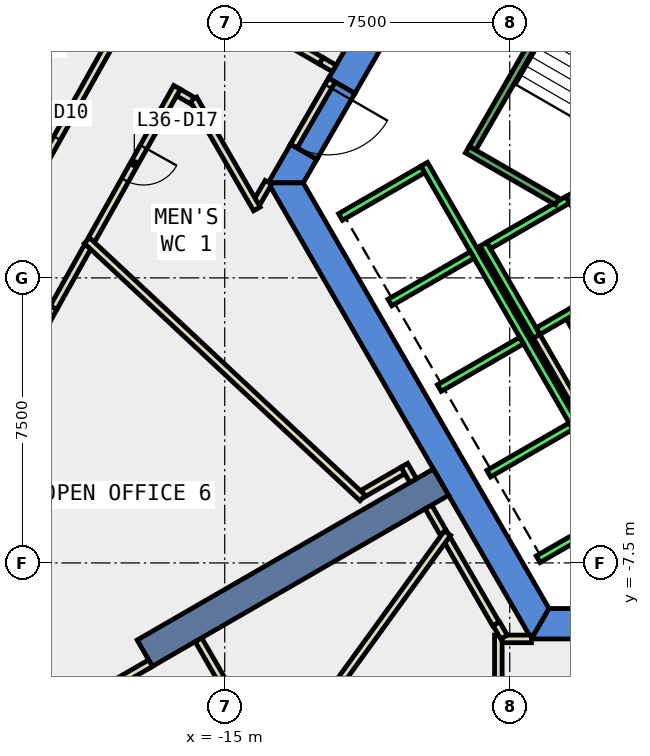
"""IFC4 building model, lengths in metres.
Left out: names, types, materials, properties, quantities, classifications, styles, units other than length and angle.
Written with IfcOpenShell. Run it as: python <this file> out.ifc"""

import sys

from ifc_helpers import new_model, si_unit, direction, frame, frame_2d, origin, place, context, subcontext, project, spatial, polyline, rectangle, outline, extrude, element, fill, save


model = new_model("IFC4")
c1 = context("Model", 3, precision=1e-05, world=origin(), true_north=direction((0.0, 1.0)))
c2 = subcontext(c1, "Body", "Model", "MODEL_VIEW")
j1 = project(units=[si_unit("LENGTHUNIT", "METRE"), si_unit("PLANEANGLEUNIT", "RADIAN")], contexts=[c1])
p1 = place(None, origin())
s1 = spatial("IfcSite", under=j1, at=p1, CompositionType="ELEMENT")
p2 = place(p1, origin())
s2 = spatial("IfcBuilding", under=s1, at=p2, CompositionType="ELEMENT")
p3 = place(p2, frame((0.0, 0.0, 163.4)))
s3 = spatial("IfcBuildingStorey", under=s2, at=p3, CompositionType="ELEMENT", Elevation=163.4)
p4 = place(p3, frame((0.0, 0.0, -0.4)))
e1 = element("IfcWall", 1, at=p4, inside=s3, PredefinedType="SHEAR", context=c2, shape_type="SweptSolid", body=[
    extrude(outline(polyline([(-12.267, 5.252), (-11.575, 4.852), (-6.466, 13.7), (-6.928, 14.5), (-12.267, 5.252)])), origin(), (0.0, 0.0, 1.0), 4.2),
])
p5 = place(p3, frame((0.0, 0.0, -0.4)))
e2 = element("IfcWall", 2, at=p5, inside=s3, PredefinedType="SHEAR", context=c2, shape_type="SweptSolid", body=[
    extrude(outline(polyline([(-12.575, 3.12), (-13.267, 3.52), (-13.856, 2.5), (-12.933, 2.5), (-12.575, 3.12)])), origin(), (0.0, 0.0, 1.0), 4.2),
])
p6 = place(p3, frame((0.0, 0.0, 3.6)))
e3 = element("IfcWall", 3, at=p6, inside=s3, PredefinedType="SHEAR", context=c2, shape_type="SweptSolid", body=[
    extrude(outline(polyline([(-13.267, 3.52), (-12.575, 3.12), (-11.575, 4.852), (-12.267, 5.252), (-13.267, 3.52)])), origin(), (0.0, 0.0, 1.0), 0.2),
])
p7 = place(p3, frame((0.0, 0.0, -0.4)))
e4 = element("IfcWall", 4, at=p7, inside=s3, PredefinedType="SHEAR", context=c2, shape_type="SweptSolid", body=[
    extrude(outline(polyline([(-13.856, 2.5), (-6.928, -9.5), (-6.466, -8.7), (-12.933, 2.5), (-13.856, 2.5)])), origin(), (0.0, 0.0, 1.0), 4.2),
])
p8 = place(p3, frame((0.0, 0.0, -0.4)))
e5 = element("IfcWall", 5, at=p8, inside=s3, PredefinedType="SHEAR", context=c2, shape_type="SweptSolid", body=[
    extrude(outline(polyline([(3.75, -9.5), (3.75, -8.7), (-6.466, -8.7), (-6.928, -9.5), (3.75, -9.5)])), origin(), (0.0, 0.0, 1.0), 4.2),
])
p9 = place(p3, frame((-9.31, -5.375, -0.4), z_axis=(0.0, 0.0, 1.0), x_axis=(-0.866017533419, -0.500013631625, 0.0)))
e6 = element("IfcWall", 6, at=p9, inside=s3, PredefinedType="SHEAR", context=c2, shape_type="SweptSolid", body=[
    extrude(rectangle(XDim=9.0, YDim=0.8, at=frame_2d((4.5, 0.0))), origin(), (0.0, 0.0, 1.0), 4.2),
])
p10 = place(p3, frame((-14.922, 7.131, 0.0), z_axis=(0.0, 0.0, 1.0), x_axis=(0.866124025492, -0.499829143273, 0.0)))
e7 = element("IfcWall", 7, at=p10, inside=s3, PredefinedType="PARTITIONING", context=c2, shape_type="SweptSolid", body=[
    extrude(rectangle(XDim=2.839, YDim=0.2, at=frame_2d((1.42, 0.0))), origin(), (0.0, 0.0, 1.0), 3.8),
])
p11 = place(p3, frame((-13.85, 2.514, 0.0), z_axis=(0.0, 0.0, 1.0), x_axis=(-0.500418219013, -0.865783810244, 0.0)))
e8 = element("IfcWall", 8, at=p11, inside=s3, PredefinedType="PARTITIONING", context=c2, shape_type="SweptSolid", body=[
    extrude(rectangle(XDim=0.607, YDim=0.2, at=frame_2d((0.304, 0.0))), origin(), (0.0, 0.0, 1.0), 3.8),
])
p12 = place(p3, frame((-14.154, 1.815, 0.0), z_axis=(0.0, 0.0, 1.0), x_axis=(-0.500038857296, 0.866002968352, 0.0)))
e9 = element("IfcWall", 9, at=p12, inside=s3, PredefinedType="PARTITIONING", context=c2, shape_type="SweptSolid", body=[
    extrude(rectangle(XDim=3.34, YDim=0.2, at=frame_2d((1.67, 0.0))), origin(), (0.0, 0.0, 1.0), 3.8),
])
p13 = place(p3, frame((-15.86, 4.671, 0.0), z_axis=(0.0, 0.0, 1.0), x_axis=(-0.866047486323, 0.49996174997, 0.0)))
e10 = element("IfcWall", 10, at=p13, inside=s3, PredefinedType="PARTITIONING", context=c2, shape_type="SweptSolid", body=[
    extrude(rectangle(XDim=0.412, YDim=0.2, at=frame_2d((0.206, 0.0))), origin(), (0.0, 0.0, 1.0), 3.8),
])
p14 = place(p3, frame((-16.255, 5.014, 0.0), z_axis=(0.0, 0.0, 1.0), x_axis=(-0.488988017817, -0.87229050117, 0.0)))
e11 = element("IfcWall", 11, at=p14, inside=s3, PredefinedType="PARTITIONING", context=c2, shape_type="SweptSolid", body=[
    extrude(rectangle(XDim=4.599, YDim=0.2, at=frame_2d((2.3, 0.0))), origin(), (0.0, 0.0, 1.0), 3.8),
])
p15 = place(p14, frame((1.8, 0.0, 0.0)))
e12 = element("IfcOpeningElement", 12, at=p15, cuts=e11, PredefinedType="OPENING", context=c2, shape_type="SweptSolid", body=[
    extrude(rectangle(XDim=1.0, YDim=2.1, at=frame_2d((0.5, 1.05))), frame((0.0, 0.11, 0.0), z_axis=(0.0, -1.0, 0.0), x_axis=(1.0, 0.0, 0.0)), (0.0, 0.0, 1.0), 0.22),
])
p16 = place(p3, frame((-18.602, 0.828, 0.0), z_axis=(0.0, 0.0, 1.0), x_axis=(-0.488969229043, -0.872301033502, 0.0)))
e13 = element("IfcWall", 13, at=p16, inside=s3, PredefinedType="PARTITIONING", context=c2, shape_type="SweptSolid", body=[
    extrude(rectangle(XDim=1.849, YDim=0.2, at=frame_2d((0.924, 0.0))), origin(), (0.0, 0.0, 1.0), 3.8),
])
p17 = place(p3, frame((-19.506, -0.785, 0.0), z_axis=(0.0, 0.0, 1.0), x_axis=(-0.477513909405, -0.878624189472, 0.0)))
e14 = element("IfcWall", 14, at=p17, inside=s3, PredefinedType="PARTITIONING", context=c2, shape_type="SweptSolid", body=[
    extrude(rectangle(XDim=6.956, YDim=0.2, at=frame_2d((3.478, 0.0))), origin(), (0.0, 0.0, 1.0), 3.8),
])
p18 = place(p17, frame((2.978, 0.0, 0.0)))
e15 = element("IfcOpeningElement", 15, at=p18, cuts=e14, PredefinedType="OPENING", context=c2, shape_type="SweptSolid", body=[
    extrude(rectangle(XDim=1.0, YDim=2.1, at=frame_2d((0.5, 1.05))), frame((0.0, 0.11, 0.0), z_axis=(0.0, -1.0, 0.0), x_axis=(1.0, 0.0, 0.0)), (0.0, 0.0, 1.0), 0.22),
])
p19 = place(p3, frame((-21.381, 0.165, 0.0), z_axis=(0.0, 0.0, 1.0), x_axis=(0.489014139272, 0.872275857509, 0.0)))
e16 = element("IfcWall", 16, at=p19, inside=s3, PredefinedType="PARTITIONING", context=c2, shape_type="SweptSolid", body=[
    extrude(rectangle(XDim=7.057, YDim=0.2, at=frame_2d((3.529, 0.0))), origin(), (0.0, 0.0, 1.0), 3.8),
])
p20 = place(p19, frame((3.029, 0.0, 0.0)))
e17 = element("IfcOpeningElement", 17, at=p20, cuts=e16, PredefinedType="OPENING", context=c2, shape_type="SweptSolid", body=[
    extrude(rectangle(XDim=1.0, YDim=2.1, at=frame_2d((0.5, 1.05))), frame((0.0, 0.11, 0.0), z_axis=(0.0, -1.0, 0.0), x_axis=(1.0, 0.0, 0.0)), (0.0, 0.0, 1.0), 0.22),
])
p21 = place(p3, frame((-5.126, -2.422, 0.0), z_axis=(0.0, 0.0, 1.0), x_axis=(-0.500062241894, 0.865989465428, 0.0)))
e18 = element("IfcWall", 18, at=p21, inside=s3, PredefinedType="PARTITIONING", context=c2, shape_type="SweptSolid", body=[
    extrude(rectangle(XDim=1.7, YDim=0.2, at=frame_2d((0.85, 0.0))), origin(), (0.0, 0.0, 1.0), 3.8),
])
p22 = place(p3, frame((-5.492, -3.788, 0.0), z_axis=(0.0, 0.0, 1.0), x_axis=(-0.500008949224, 0.866020236886, 0.0)))
e19 = element("IfcWall", 19, at=p22, inside=s3, PredefinedType="PARTITIONING", context=c2, shape_type="SweptSolid", body=[
    extrude(rectangle(XDim=2.68, YDim=0.2, at=frame_2d((1.34, 0.0))), origin(), (0.0, 0.0, 1.0), 3.8),
])
p23 = place(p3, frame((-7.722, -9.499, 0.0), z_axis=(0.0, 0.0, 1.0), x_axis=(1.0, 0.0, 0.0)))
e20 = element("IfcWall", 20, at=p23, inside=s3, PredefinedType="PARTITIONING", context=c2, shape_type="SweptSolid", body=[
    extrude(rectangle(XDim=0.793, YDim=0.2, at=frame_2d((0.396, 0.0))), origin(), (0.0, 0.0, 1.0), 3.8),
])
p24 = place(p3, frame((-7.8, -17.171, 0.0), z_axis=(0.0, 0.0, 1.0), x_axis=(0.0, 1.0, 0.0)))
e21 = element("IfcWall", 21, at=p24, inside=s3, PredefinedType="PARTITIONING", context=c2, shape_type="SweptSolid", body=[
    extrude(rectangle(XDim=7.772, YDim=0.2, at=frame_2d((3.886, 0.0))), origin(), (0.0, 0.0, 1.0), 3.8),
])
p25 = place(p24, frame((3.386, 0.0, 0.0)))
e22 = element("IfcOpeningElement", 22, at=p25, cuts=e21, PredefinedType="OPENING", context=c2, shape_type="SweptSolid", body=[
    extrude(rectangle(XDim=1.0, YDim=2.1, at=frame_2d((0.5, 1.05))), frame((0.0, 0.11, 0.0), z_axis=(0.0, -1.0, 0.0), x_axis=(1.0, 0.0, 0.0)), (0.0, 0.0, 1.0), 0.22),
])
p26 = place(p3, frame((-7.862, -9.107, 0.0), z_axis=(0.0, 0.0, 1.0), x_axis=(-0.499994038704, 0.866028845513, 0.0)))
e23 = element("IfcWall", 23, at=p26, inside=s3, PredefinedType="PARTITIONING", context=c2, shape_type="SweptSolid", body=[
    extrude(rectangle(XDim=2.568, YDim=0.2, at=frame_2d((1.284, 0.0))), origin(), (0.0, 0.0, 1.0), 3.8),
])
p27 = place(p3, frame((-7.65, -9.451, 0.0), z_axis=(0.0, 0.0, 1.0), x_axis=(-0.500297731093, 0.865853440406, 0.0)))
e24 = element("IfcWall", 24, at=p27, inside=s3, PredefinedType="PARTITIONING", context=c2, shape_type="SweptSolid", body=[
    extrude(rectangle(XDim=0.404, YDim=0.2, at=frame_2d((0.202, 0.0))), origin(), (0.0, 0.0, 1.0), 3.8),
])
p28 = place(p3, frame((-9.246, -6.71, 0.0), z_axis=(0.0, 0.0, 1.0), x_axis=(-0.499570510076, 0.86627322795, 0.0)))
e25 = element("IfcWall", 25, at=p28, inside=s3, PredefinedType="PARTITIONING", context=c2, shape_type="SweptSolid", body=[
    extrude(rectangle(XDim=0.788, YDim=0.2, at=frame_2d((0.394, 0.0))), origin(), (0.0, 0.0, 1.0), 3.8),
])
p29 = place(p3, frame((-10.31, -5.066, 0.0), z_axis=(0.0, 0.0, 1.0), x_axis=(-0.865587329375, -0.500758000661, 0.0)))
e26 = element("IfcWall", 26, at=p29, inside=s3, PredefinedType="PARTITIONING", context=c2, shape_type="SweptSolid", body=[
    extrude(rectangle(XDim=1.21, YDim=0.2, at=frame_2d((0.605, 0.0))), origin(), (0.0, 0.0, 1.0), 3.8),
])
p30 = place(p3, frame((-11.372, -5.79, 0.0), z_axis=(0.0, 0.0, 1.0), x_axis=(-0.730922728623, 0.682460229451, 0.0)))
e27 = element("IfcWall", 27, at=p30, inside=s3, PredefinedType="PARTITIONING", context=c2, shape_type="SweptSolid", body=[
    extrude(rectangle(XDim=9.924, YDim=0.2, at=frame_2d((4.962, 0.0))), origin(), (0.0, 0.0, 1.0), 3.8),
])
p31 = place(p3, frame((-13.744, -13.076, 0.0), z_axis=(0.0, 0.0, 1.0), x_axis=(0.586577314901, 0.809893235953, 0.0)))
e28 = element("IfcWall", 28, at=p31, inside=s3, PredefinedType="PARTITIONING", context=c2, shape_type="SweptSolid", body=[
    extrude(rectangle(XDim=7.854, YDim=0.2, at=frame_2d((3.927, 0.0))), origin(), (0.0, 0.0, 1.0), 3.8),
])
p32 = place(p3, frame((-13.736, -12.909, 0.0), z_axis=(0.0, 0.0, 1.0), x_axis=(-0.49990810406, 0.866078453429, 0.0)))
e29 = element("IfcWall", 29, at=p32, inside=s3, PredefinedType="PARTITIONING", context=c2, shape_type="SweptSolid", body=[
    extrude(rectangle(XDim=3.908, YDim=0.2, at=frame_2d((1.954, 0.0))), origin(), (0.0, 0.0, 1.0), 3.8),
])
p33 = place(p3, frame((-16.952, -10.138, 0.0), z_axis=(0.0, 0.0, 1.0), x_axis=(-0.866054992606, -0.499948747156, 0.0)))
e30 = element("IfcWall", 30, at=p33, inside=s3, PredefinedType="PARTITIONING", context=c2, shape_type="SweptSolid", body=[
    extrude(rectangle(XDim=4.701, YDim=0.2, at=frame_2d((2.35, 0.0))), origin(), (0.0, 0.0, 1.0), 3.8),
])
p34 = place(p3, frame((-12.18, 5.202, 0.0), z_axis=(0.0, 0.0, 1.0), x_axis=(-0.50002537861, -0.866010750942, 0.0)))
e31 = element("IfcWall", 31, at=p34, inside=s3, PredefinedType="PARTITIONING", context=c2, shape_type="SweptSolid", body=[
    extrude(rectangle(XDim=2.0, YDim=0.2, at=frame_2d((1.0, 0.0))), origin(), (0.0, 0.0, 1.0), 2.4),
])
p35 = place(p34, frame((0.19, 0.0, 0.0)))
e32 = element("IfcOpeningElement", 32, at=p35, cuts=e31, PredefinedType="OPENING", context=c2, shape_type="SweptSolid", body=[
    extrude(rectangle(XDim=1.8, YDim=2.1, at=frame_2d((0.9, 1.05))), frame((0.0, 0.11, 0.0), z_axis=(0.0, -1.0, 0.0), x_axis=(1.0, 0.0, 0.0)), (0.0, 0.0, 1.0), 0.22),
])
p36 = place(p3, frame((-10.04, -5.334, 0.0), z_axis=(0.0, 0.0, 1.0), x_axis=(-0.499405191234, 0.86636854454, 0.0)))
e33 = element("IfcWall", 33, at=p36, inside=s3, PredefinedType="PARTITIONING", context=c2, shape_type="SweptSolid", body=[
    extrude(rectangle(XDim=0.466, YDim=0.2, at=frame_2d((0.233, 0.0))), origin(), (0.0, 0.0, 1.0), 3.8),
])
p37 = place(p3, frame((-12.463, 5.712, 0.0), z_axis=(0.0, 0.0, 1.0), x_axis=(0.865788603161, -0.500409926597, 0.0)))
e34 = element("IfcWall", 34, at=p37, inside=s3, PredefinedType="PARTITIONING", context=c2, shape_type="SweptSolid", body=[
    extrude(rectangle(XDim=0.4, YDim=0.2, at=frame_2d((0.2, 0.0))), origin(), (0.0, 0.0, 1.0), 2.4),
])
p38 = place(p3, frame((-5.94, 2.188, 0.0), z_axis=(0.0, 0.0, 1.0), x_axis=(0.49994636267, -0.866056369097, 0.0)))
e35 = element("IfcWall", 35, at=p38, inside=s3, PredefinedType="STANDARD", context=c2, shape_type="SweptSolid", body=[
    extrude(rectangle(XDim=2.8, YDim=0.2, at=frame_2d((1.4, 0.0))), origin(), (0.0, 0.0, 1.0), 3.8),
])
p39 = place(p38, frame((1.225, 0.0, 0.0)))
e36 = element("IfcOpeningElement", 36, at=p39, cuts=e35, PredefinedType="OPENING", context=c2, shape_type="SweptSolid", body=[
    extrude(rectangle(XDim=1.1, YDim=2.1, at=frame_2d((0.55, 1.05))), frame((0.0, 0.11, 0.0), z_axis=(0.0, -1.0, 0.0), x_axis=(1.0, 0.0, 0.0)), (0.0, 0.0, 1.0), 0.22),
])
p40 = place(p3, frame((-8.192, 0.888, 0.0), z_axis=(0.0, 0.0, 1.0), x_axis=(0.49994636267, -0.866056369097, 0.0)))
e37 = element("IfcWall", 37, at=p40, inside=s3, PredefinedType="STANDARD", context=c2, shape_type="SweptSolid", body=[
    extrude(rectangle(XDim=2.8, YDim=0.2, at=frame_2d((1.4, 0.0))), origin(), (0.0, 0.0, 1.0), 3.8),
])
for number, where, z_axis, x_axis in (
    (38, (-5.977, 2.052, 0.0), (0.0, 0.0, 1.0), (-0.866, -0.5, 0.0)),
    (39, (-4.677, -0.2, 0.0), (0.0, 0.0, 1.0), (-0.866, -0.5, 0.0)),
):
    element("IfcWall", number, at=place(p3, frame(where, z_axis=z_axis, x_axis=x_axis)), inside=s3, PredefinedType="STANDARD", context=c2, shape_type="SweptSolid", body=[
        extrude(rectangle(XDim=2.399, YDim=0.2, at=frame_2d((1.2, 0.0))), origin(), (0.0, 0.0, 1.0), 3.8),
    ])
p41 = place(p3, frame((-9.751, 2.99, 0.0), z_axis=(0.0, 0.0, 1.0), x_axis=(0.50000090737, -0.866024879913, 0.0)))
e40 = element("IfcWall", 40, at=p41, inside=s3, PredefinedType="STANDARD", context=c2, shape_type="SweptSolid", body=[
    extrude(rectangle(XDim=10.6, YDim=0.2, at=frame_2d((5.3, 0.0))), origin(), (0.0, 0.0, 1.0), 3.8),
])
p42 = place(p3, frame((-9.788, 2.853, 0.0), z_axis=(0.0, 0.0, 1.0), x_axis=(-0.865998541277, -0.500046524342, 0.0)))
e41 = element("IfcWall", 41, at=p42, inside=s3, PredefinedType="STANDARD", context=c2, shape_type="SweptSolid", body=[
    extrude(rectangle(XDim=2.5, YDim=0.2, at=frame_2d((1.25, 0.0))), origin(), (0.0, 0.0, 1.0), 3.8),
])
for number, where, z_axis, x_axis in (
    (42, (-8.488, 0.602, 0.0), (0.0, 0.0, 1.0), (-0.866, -0.5, 0.0)),
    (43, (-7.188, -1.65, 0.0), (0.0, 0.0, 1.0), (-0.866, -0.5, 0.0)),
    (44, (-5.888, -3.902, 0.0), (0.0, 0.0, 1.0), (-0.866, -0.5, 0.0)),
    (45, (-4.588, -6.153, 0.0), (0.0, 0.0, 1.0), (-0.866, -0.5, 0.0)),
):
    element("IfcWall", number, at=place(p3, frame(where, z_axis=z_axis, x_axis=x_axis)), inside=s3, PredefinedType="STANDARD", context=c2, shape_type="SweptSolid", body=[
        extrude(rectangle(XDim=2.5, YDim=0.2, at=frame_2d((1.25, 0.0))), origin(), (0.0, 0.0, 1.0), 3.8),
    ])
p43 = place(p3, frame((-6.25, 2.01, 0.0), z_axis=(0.0, 0.0, 1.0), x_axis=(-0.86611865017, 0.499838457731, 0.0)))
e46 = element("IfcWall", 46, at=p43, inside=s3, PredefinedType="STANDARD", context=c2, shape_type="SweptSolid", body=[
    extrude(rectangle(XDim=2.733, YDim=0.2, at=frame_2d((1.366, 0.0))), origin(), (0.0, 0.0, 1.0), 3.8),
])
p44 = place(p3, frame((-5.03, 9.388, 0.0), z_axis=(0.0, 0.0, 1.0), x_axis=(-0.499978703459, -0.866037698999, 0.0)))
e47 = element("IfcWall", 47, at=p44, inside=s3, PredefinedType="STANDARD", context=c2, shape_type="SweptSolid", body=[
    extrude(rectangle(XDim=6.9, YDim=0.2, at=frame_2d((3.45, 0.0))), origin(), (0.0, 0.0, 1.0), 3.8),
])
p45 = place(p20, origin())
e48 = element("IfcDoor", 48, at=p45, inside=s3, OperationType="SINGLE_SWING_RIGHT", PredefinedType="DOOR", context=c2, shape_type="SweptSolid", body=[
    extrude(rectangle(XDim=1.0, YDim=2.1, at=frame_2d((0.5, 1.05))), frame((0.0, 0.025, 0.0), z_axis=(0.0, -1.0, 0.0), x_axis=(1.0, 0.0, 0.0)), (0.0, 0.0, 1.0), 0.05),
])
fill(e17, e48)
p46 = place(p15, origin())
e49 = element("IfcDoor", 49, at=p46, inside=s3, OperationType="SINGLE_SWING_LEFT", PredefinedType="DOOR", context=c2, shape_type="SweptSolid", body=[
    extrude(rectangle(XDim=1.0, YDim=2.1, at=frame_2d((0.5, 1.05))), frame((0.0, 0.025, 0.0), z_axis=(0.0, -1.0, 0.0), x_axis=(1.0, 0.0, 0.0)), (0.0, 0.0, 1.0), 0.05),
])
fill(e12, e49)
p47 = place(p35, origin())
e50 = element("IfcDoor", 50, at=p47, inside=s3, OperationType="DOUBLE_DOOR_SINGLE_SWING", PredefinedType="DOOR", context=c2, shape_type="SweptSolid", body=[
    extrude(rectangle(XDim=1.8, YDim=2.1, at=frame_2d((0.9, 1.05))), frame((0.0, 0.025, 0.0), z_axis=(0.0, -1.0, 0.0), x_axis=(1.0, 0.0, 0.0)), (0.0, 0.0, 1.0), 0.05),
])
fill(e32, e50)
save(model, sys.argv[1])
